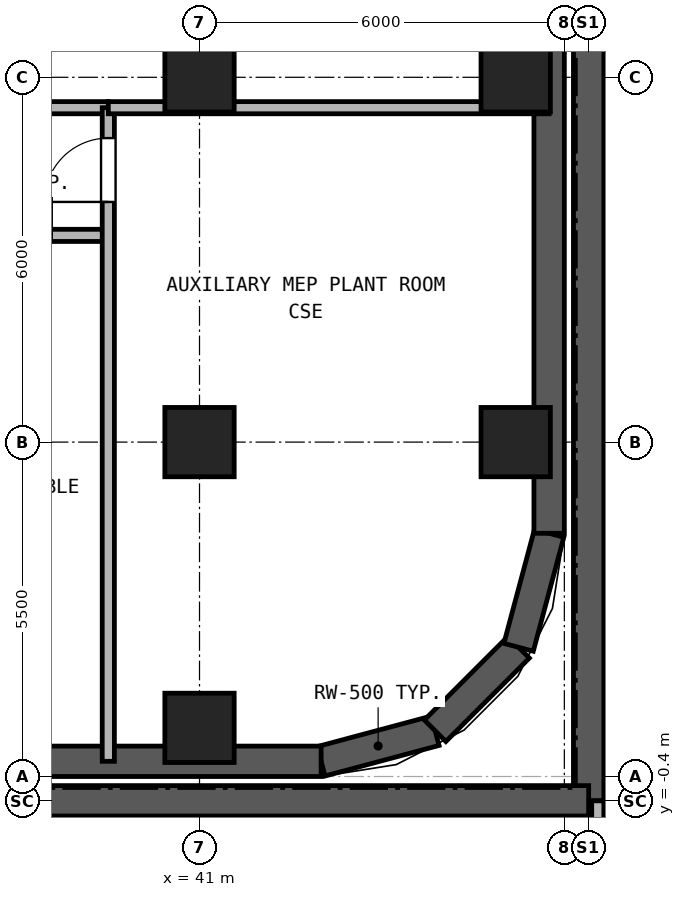
"""IFC4 building model, lengths in metres.
Left out: names, types, materials, properties, quantities, classifications, styles, units other than length and angle.
Written with IfcOpenShell. Run it as: python <this file> out.ifc"""

import sys

from ifc_helpers import new_model, si_unit, direction, frame, frame_2d, origin, origin_2d, place, context, subcontext, project, spatial, rectangle, hollow_rectangle, extrude, source, transform, mapped, element, fill, save


model = new_model("IFC4")
c1 = context("Model", 3, precision=1e-05, world=origin(), true_north=direction((0.0, 1.0)))
c2 = subcontext(c1, "Body", "Model", "MODEL_VIEW")
j1 = project(units=[si_unit("LENGTHUNIT", "METRE"), si_unit("PLANEANGLEUNIT", "RADIAN")], contexts=[c1])
p1 = place(None, origin())
s1 = spatial("IfcSite", under=j1, at=p1, CompositionType="ELEMENT")
p2 = place(p1, origin())
s2 = spatial("IfcBuilding", under=s1, at=p2, CompositionType="ELEMENT")
p3 = place(p2, frame((0.0, 0.0, -8.4)))
s3 = spatial("IfcBuildingStorey", under=s2, at=p3, CompositionType="ELEMENT", Elevation=-8.4)
m1 = source(origin(), c2, "Body", "SweptSolid", [
    extrude(hollow_rectangle(XDim=1.14, YDim=1.14, WallThickness=0.07, at=origin_2d()), origin(), (0.0, 0.0, 1.0), 3.88),
])
for number, where, z_axis, x_axis in (
    (1, (41.0, 0.8, 0.0), (0.0, 0.0, 1.0), (1.0, 0.0, 0.0)),
    (2, (46.2, 5.5, 0.0), (0.0, 0.0, 1.0), (1.0, 0.0, 0.0)),
    (3, (46.2, 11.5, 0.0), (0.0, 0.0, 1.0), (1.0, 0.0, 0.0)),
    (4, (41.0, 5.5, 0.0), (0.0, 0.0, 1.0), (1.0, 0.0, 0.0)),
    (5, (41.0, 11.5, 0.0), (0.0, 0.0, 1.0), (1.0, 0.0, 0.0)),
):
    element("IfcColumn", number, at=place(p3, frame(where, z_axis=z_axis, x_axis=x_axis)), inside=s3, PredefinedType="COLUMN", context=c2, shape_type="MappedRepresentation", body=[
        mapped(m1, transform((0.0, 0.0, 0.0), x_axis=(1.0, 0.0, 0.0), y_axis=(0.0, 1.0, 0.0), z_axis=(0.0, 0.0, 1.0), scale=1.0)),
    ])
for number, where, z_axis, x_axis in (
    (6, (43.0, 0.25, 0.0), (0.0, 0.0, 1.0), (0.966, 0.259, 0.0)),
    (7, (44.875, 0.752, 0.0), (0.0, 0.0, 1.0), (0.707, 0.707, 0.0)),
    (8, (46.248, 2.125, 0.0), (0.0, 0.0, 1.0), (0.259, 0.966, 0.0)),
):
    element("IfcWall", number, at=place(p3, frame(where, z_axis=z_axis, x_axis=x_axis)), inside=s3, PredefinedType="USERDEFINED", context=c2, shape_type="SweptSolid", body=[
        extrude(rectangle(XDim=1.941, YDim=0.5, at=frame_2d((0.971, 0.0))), origin(), (0.0, 0.0, 1.0), 3.88),
    ])
p4 = place(p3, frame((46.75, 4.0, 0.0), z_axis=(0.0, 0.0, 1.0), x_axis=(0.0, 1.0, 0.0)))
e9 = element("IfcWall", 9, at=p4, inside=s3, PredefinedType="USERDEFINED", context=c2, shape_type="SweptSolid", body=[
    extrude(rectangle(XDim=32.5, YDim=0.5, at=frame_2d((16.25, 0.0))), origin(), (0.0, 0.0, 1.0), 3.88),
])
p5 = place(p3, frame((4.0, 0.25, 0.0), z_axis=(0.0, 0.0, 1.0), x_axis=(1.0, 0.0, 0.0)))
e10 = element("IfcWall", 10, at=p5, inside=s3, PredefinedType="USERDEFINED", context=c2, shape_type="SweptSolid", body=[
    extrude(rectangle(XDim=39.0, YDim=0.5, at=frame_2d((19.5, 0.0))), origin(), (0.0, 0.0, 1.0), 3.88),
])
p6 = place(p3, frame((47.4, 40.5, 0.0), z_axis=(0.0, 0.0, 1.0), x_axis=(0.0, -1.0, 0.0)))
e11 = element("IfcWall", 11, at=p6, inside=s3, PredefinedType="USERDEFINED", context=c2, shape_type="SweptSolid", body=[
    extrude(rectangle(XDim=40.9, YDim=0.5, at=frame_2d((20.45, 0.0))), origin(), (0.0, 0.0, 1.0), 3.88),
])
p7 = place(p3, frame((47.4, -0.4, 0.0), z_axis=(0.0, 0.0, 1.0), x_axis=(-1.0, 0.0, 0.0)))
e12 = element("IfcWall", 12, at=p7, inside=s3, PredefinedType="USERDEFINED", context=c2, shape_type="SweptSolid", body=[
    extrude(rectangle(XDim=47.4, YDim=0.5, at=frame_2d((23.7, 0.0))), origin(), (0.0, 0.0, 1.0), 3.88),
])
p8 = place(p3, frame((7.5, 8.9, 0.0), z_axis=(0.0, 0.0, 1.0), x_axis=(1.0, 0.0, 0.0)))
e13 = element("IfcWall", 13, at=p8, inside=s3, PredefinedType="PARTITIONING", context=c2, shape_type="SweptSolid", body=[
    extrude(rectangle(XDim=32.0, YDim=0.2, at=frame_2d((16.0, 0.0))), origin(), (0.0, 0.0, 1.0), 3.88),
])
p9 = place(p8, frame((7.0, 0.0, 0.0)))
e14 = element("IfcOpeningElement", 14, at=p9, cuts=e13, PredefinedType="OPENING", context=c2, shape_type="SweptSolid", body=[
    extrude(rectangle(XDim=1.5, YDim=2.25, at=frame_2d((0.75, 1.125))), frame((0.0, 0.11, 0.0), z_axis=(0.0, -1.0, 0.0), x_axis=(1.0, 0.0, 0.0)), (0.0, 0.0, 1.0), 0.22),
])
p10 = place(p8, frame((21.65, 0.0, 0.0)))
e15 = element("IfcOpeningElement", 15, at=p10, cuts=e13, PredefinedType="OPENING", context=c2, shape_type="SweptSolid", body=[
    extrude(rectangle(XDim=1.5, YDim=2.25, at=frame_2d((0.75, 1.125))), frame((0.0, 0.11, 0.0), z_axis=(0.0, -1.0, 0.0), x_axis=(1.0, 0.0, 0.0)), (0.0, 0.0, 1.0), 0.22),
])
p11 = place(p8, frame((30.15, 0.0, 0.0)))
e16 = element("IfcOpeningElement", 16, at=p11, cuts=e13, PredefinedType="OPENING", context=c2, shape_type="SweptSolid", body=[
    extrude(rectangle(XDim=0.92, YDim=2.1, at=frame_2d((0.46, 1.05))), frame((0.0, 0.11, 0.0), z_axis=(0.0, -1.0, 0.0), x_axis=(1.0, 0.0, 0.0)), (0.0, 0.0, 1.0), 0.22),
])
p12 = place(p3, frame((30.7, 11.0, 0.0), z_axis=(0.0, 0.0, 1.0), x_axis=(1.0, 0.0, 0.0)))
e17 = element("IfcWall", 17, at=p12, inside=s3, PredefinedType="PARTITIONING", context=c2, shape_type="SweptSolid", body=[
    extrude(rectangle(XDim=8.8, YDim=0.2, at=frame_2d((4.4, 0.0))), origin(), (0.0, 0.0, 1.0), 3.88),
])
p13 = place(p3, frame((39.5, 0.25, 0.0), z_axis=(0.0, 0.0, 1.0), x_axis=(0.0, 1.0, 0.0)))
e18 = element("IfcWall", 18, at=p13, inside=s3, PredefinedType="PARTITIONING", context=c2, shape_type="SweptSolid", body=[
    extrude(rectangle(XDim=10.75, YDim=0.2, at=frame_2d((5.375, 0.0))), origin(), (0.0, 0.0, 1.0), 3.88),
])
p14 = place(p13, frame((9.2, 0.0, 0.0)))
e19 = element("IfcOpeningElement", 19, at=p14, cuts=e18, PredefinedType="OPENING", context=c2, shape_type="SweptSolid", body=[
    extrude(rectangle(XDim=1.05, YDim=2.15, at=frame_2d((0.525, 1.075))), frame((0.0, 0.11, 0.0), z_axis=(0.0, -1.0, 0.0), x_axis=(1.0, 0.0, 0.0)), (0.0, 0.0, 1.0), 0.22),
])
p15 = place(p3, frame((39.5, 11.0, 0.0), z_axis=(0.0, 0.0, 1.0), x_axis=(1.0, 0.0, 0.0)))
e20 = element("IfcWall", 20, at=p15, inside=s3, PredefinedType="PARTITIONING", context=c2, shape_type="SweptSolid", body=[
    extrude(rectangle(XDim=7.25, YDim=0.2, at=frame_2d((3.625, 0.0))), origin(), (0.0, 0.0, 1.0), 3.88),
])
p16 = place(p3, frame((47.55, -10.95, 0.0), z_axis=(0.0, 0.0, 1.0), x_axis=(0.0, 1.0, 0.0)))
e21 = element("IfcWall", 21, at=p16, inside=s3, PredefinedType="PARTITIONING", context=c2, shape_type="SweptSolid", body=[
    extrude(rectangle(XDim=10.55, YDim=0.2, at=frame_2d((5.275, 0.0))), origin(), (0.0, 0.0, 1.0), 3.88),
])
p17 = place(p16, frame((5.35, 0.0, 0.0)))
e22 = element("IfcOpeningElement", 22, at=p17, cuts=e21, PredefinedType="OPENING", context=c2, shape_type="SweptSolid", body=[
    extrude(rectangle(XDim=1.3, YDim=2.2, at=frame_2d((0.65, 1.1))), frame((0.0, 0.11, 0.0), z_axis=(0.0, -1.0, 0.0), x_axis=(1.0, 0.0, 0.0)), (0.0, 0.0, 1.0), 0.22),
])
p18 = place(p14, origin())
e23 = element("IfcDoor", 23, at=p18, inside=s3, OperationType="SINGLE_SWING_LEFT", PredefinedType="DOOR", context=c2, shape_type="SweptSolid", body=[
    extrude(rectangle(XDim=1.05, YDim=2.15, at=frame_2d((0.525, 1.075))), frame((0.0, 0.025, 0.0), z_axis=(0.0, -1.0, 0.0), x_axis=(1.0, 0.0, 0.0)), (0.0, 0.0, 1.0), 0.05),
])
fill(e19, e23)
save(model, sys.argv[1])
